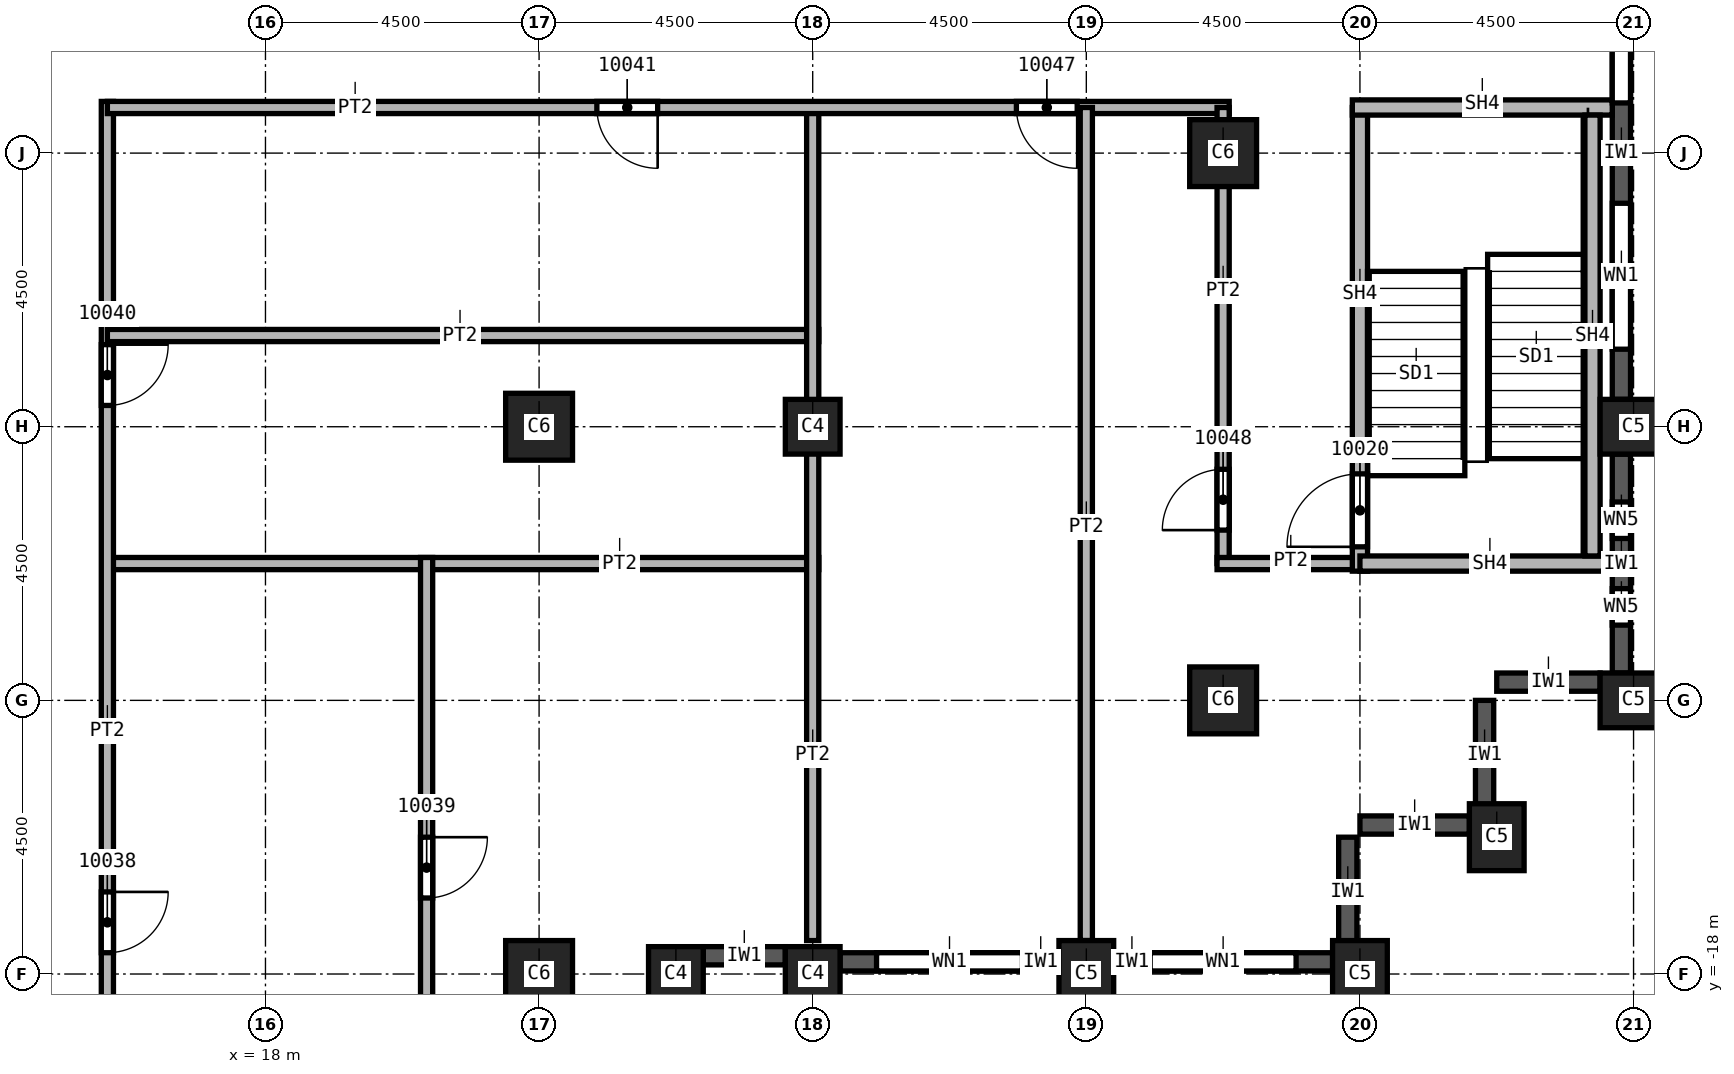
"""IFC4 building model, lengths in metres.
Left out: names, types, materials, properties, quantities, classifications, styles, units other than length and angle.
Written with IfcOpenShell. Run it as: python <this file> out.ifc"""

import sys

from ifc_helpers import new_model, si_unit, direction, frame, frame_2d, origin, origin_2d, place, context, subcontext, project, spatial, rectangle, extrude, element, fill, save


model = new_model("IFC4")
c1 = context("Model", 3, precision=1e-05, world=origin(), true_north=direction((0.0, 1.0)))
c2 = subcontext(c1, "Body", "Model", "MODEL_VIEW")
j1 = project(units=[si_unit("LENGTHUNIT", "METRE"), si_unit("PLANEANGLEUNIT", "RADIAN")], contexts=[c1])
p1 = place(None, origin())
s1 = spatial("IfcSite", under=j1, at=p1, CompositionType="ELEMENT")
p2 = place(p1, origin())
s2 = spatial("IfcBuilding", under=s1, at=p2, CompositionType="ELEMENT")
p3 = place(p2, frame((0.0, 0.0, 174.0)))
s3 = spatial("IfcBuildingStorey", under=s2, at=p3, CompositionType="ELEMENT", Elevation=174.0)
for number, where, z_axis, x_axis in (
    (1, (40.5, -9.0, 0.0), (0.0, 0.0, 1.0), (0.0, 1.0, 0.0)),
    (2, (40.5, -13.5, 0.0), (0.0, 0.0, 1.0), (0.0, 1.0, 0.0)),
    (3, (38.25, -15.75, 0.0), (0.0, 0.0, 1.0), (1.0, 0.0, 0.0)),
    (4, (31.5, -18.0, 0.0), (0.0, 0.0, 1.0), (1.0, 0.0, 0.0)),
    (5, (36.0, -18.0, 0.0), (0.0, 0.0, 1.0), (1.0, 0.0, 0.0)),
):
    element("IfcColumn", number, at=place(p3, frame(where, z_axis=z_axis, x_axis=x_axis)), inside=s3, PredefinedType="COLUMN", context=c2, shape_type="SweptSolid", body=[
        extrude(rectangle(XDim=0.9, YDim=1.1, at=origin_2d()), origin(), (0.0, 0.0, 1.0), 3.59),
    ])
for number, where, z_axis, x_axis in (
    (6, (33.75, -4.5, 0.0), (0.0, 0.0, 1.0), (1.0, 0.0, 0.0)),
    (7, (33.75, -13.5, 0.0), (0.0, 0.0, 1.0), (1.0, 0.0, 0.0)),
    (8, (22.5, -9.0, 0.0), (0.0, 0.0, 1.0), (1.0, 0.0, 0.0)),
    (9, (22.5, -18.0, 0.0), (0.0, 0.0, 1.0), (1.0, 0.0, 0.0)),
):
    element("IfcColumn", number, at=place(p3, frame(where, z_axis=z_axis, x_axis=x_axis)), inside=s3, PredefinedType="COLUMN", context=c2, shape_type="SweptSolid", body=[
        extrude(rectangle(XDim=1.1, YDim=1.1, at=origin_2d()), origin(), (0.0, 0.0, 1.0), 3.59),
    ])
for number, where, z_axis, x_axis in (
    (10, (27.0, -9.0, 0.0), (0.0, 0.0, 1.0), (1.0, 0.0, 0.0)),
    (11, (27.0, -18.0, 0.0), (0.0, 0.0, 1.0), (1.0, 0.0, 0.0)),
    (12, (24.75, -18.0, 0.0), (0.0, 0.0, 1.0), (1.0, 0.0, 0.0)),
):
    element("IfcColumn", number, at=place(p3, frame(where, z_axis=z_axis, x_axis=x_axis)), inside=s3, PredefinedType="COLUMN", context=c2, shape_type="SweptSolid", body=[
        extrude(rectangle(XDim=0.9, YDim=0.9, at=origin_2d()), origin(), (0.0, 0.0, 1.0), 3.59),
    ])
for number, where, z_axis, x_axis in (
    (13, (35.8, -17.55, 0.0), (0.0, 0.0, 1.0), (0.0, 1.0, 0.0)),
    (14, (37.8, -15.55, 0.0), (0.0, 0.0, 1.0), (-1.0, 0.0, 0.0)),
    (15, (38.05, -15.3, 0.0), (0.0, 0.0, 1.0), (0.0, 1.0, 0.0)),
):
    element("IfcWall", number, at=place(p3, frame(where, z_axis=z_axis, x_axis=x_axis)), inside=s3, PredefinedType="SOLIDWALL", context=c2, shape_type="SweptSolid", body=[
        extrude(rectangle(XDim=1.8, YDim=0.3, at=frame_2d((0.9, 0.0))), origin(), (0.0, 0.0, 1.0), 2.99),
    ])
p4 = place(p3, frame((39.95, -13.2, 0.0), z_axis=(0.0, 0.0, 1.0), x_axis=(-1.0, 0.0, 0.0)))
e16 = element("IfcWall", 16, at=p4, inside=s3, PredefinedType="SOLIDWALL", context=c2, shape_type="SweptSolid", body=[
    extrude(rectangle(XDim=1.7, YDim=0.3, at=frame_2d((0.85, 0.0))), origin(), (0.0, 0.0, 1.0), 2.99),
])
p5 = place(p3, frame((25.2, -17.7, 0.0), z_axis=(0.0, 0.0, 1.0), x_axis=(1.0, 0.0, 0.0)))
e17 = element("IfcWall", 17, at=p5, inside=s3, PredefinedType="SOLIDWALL", context=c2, shape_type="SweptSolid", body=[
    extrude(rectangle(XDim=1.35, YDim=0.3, at=frame_2d((0.675, 0.0))), origin(), (0.0, 0.0, 1.0), 2.99),
])
p6 = place(p3, frame((27.45, -17.8, 0.0), z_axis=(0.0, 0.0, 1.0), x_axis=(1.0, 0.0, 0.0)))
e18 = element("IfcWall", 18, at=p6, inside=s3, PredefinedType="SOLIDWALL", context=c2, shape_type="SweptSolid", body=[
    extrude(rectangle(XDim=3.6, YDim=0.3, at=frame_2d((1.8, 0.0))), origin(), (0.0, 0.0, 1.0), 2.99),
])
p7 = place(p6, frame((0.6, 0.0, 0.8)))
e19 = element("IfcOpeningElement", 19, at=p7, cuts=e18, PredefinedType="OPENING", context=c2, shape_type="SweptSolid", body=[
    extrude(rectangle(XDim=2.4, YDim=1.95, at=frame_2d((1.2, 0.975))), frame((0.0, 0.15, 0.0), z_axis=(0.0, -1.0, 0.0), x_axis=(1.0, 0.0, 0.0)), (0.0, 0.0, 1.0), 0.3),
])
p8 = place(p3, frame((31.95, -17.8, 0.0), z_axis=(0.0, 0.0, 1.0), x_axis=(1.0, 0.0, 0.0)))
e20 = element("IfcWall", 20, at=p8, inside=s3, PredefinedType="SOLIDWALL", context=c2, shape_type="SweptSolid", body=[
    extrude(rectangle(XDim=3.6, YDim=0.3, at=frame_2d((1.8, 0.0))), origin(), (0.0, 0.0, 1.0), 2.99),
])
p9 = place(p8, frame((0.6, 0.0, 0.8)))
e21 = element("IfcOpeningElement", 21, at=p9, cuts=e20, PredefinedType="OPENING", context=c2, shape_type="SweptSolid", body=[
    extrude(rectangle(XDim=2.4, YDim=1.95, at=frame_2d((1.2, 0.975))), frame((0.0, 0.15, 0.0), z_axis=(0.0, -1.0, 0.0), x_axis=(1.0, 0.0, 0.0)), (0.0, 0.0, 1.0), 0.3),
])
p10 = place(p3, frame((40.3, -13.05, 0.0), z_axis=(0.0, 0.0, 1.0), x_axis=(0.0, 1.0, 0.0)))
e22 = element("IfcWall", 22, at=p10, inside=s3, PredefinedType="SOLIDWALL", context=c2, shape_type="SweptSolid", body=[
    extrude(rectangle(XDim=3.6, YDim=0.3, at=frame_2d((1.8, 0.0))), origin(), (0.0, 0.0, 1.0), 2.99),
])
p11 = place(p10, frame((0.788, 0.0, 0.8)))
e23 = element("IfcOpeningElement", 23, at=p11, cuts=e22, PredefinedType="OPENING", context=c2, shape_type="SweptSolid", body=[
    extrude(rectangle(XDim=0.6, YDim=1.95, at=frame_2d((0.3, 0.975))), frame((0.0, 0.15, 0.0), z_axis=(0.0, -1.0, 0.0), x_axis=(1.0, 0.0, 0.0)), (0.0, 0.0, 1.0), 0.3),
])
p12 = place(p10, frame((2.212, 0.0, 0.8)))
e24 = element("IfcOpeningElement", 24, at=p12, cuts=e22, PredefinedType="OPENING", context=c2, shape_type="SweptSolid", body=[
    extrude(rectangle(XDim=0.6, YDim=1.95, at=frame_2d((0.3, 0.975))), frame((0.0, 0.15, 0.0), z_axis=(0.0, -1.0, 0.0), x_axis=(1.0, 0.0, 0.0)), (0.0, 0.0, 1.0), 0.3),
])
p13 = place(p3, frame((40.3, -8.55, 0.0), z_axis=(0.0, 0.0, 1.0), x_axis=(0.0, 1.0, 0.0)))
e25 = element("IfcWall", 25, at=p13, inside=s3, PredefinedType="SOLIDWALL", context=c2, shape_type="SweptSolid", body=[
    extrude(rectangle(XDim=8.1, YDim=0.3, at=frame_2d((4.05, 0.0))), origin(), (0.0, 0.0, 1.0), 2.99),
])
p14 = place(p13, frame((0.825, 0.0, 0.8)))
e26 = element("IfcOpeningElement", 26, at=p14, cuts=e25, PredefinedType="OPENING", context=c2, shape_type="SweptSolid", body=[
    extrude(rectangle(XDim=2.4, YDim=1.95, at=frame_2d((1.2, 0.975))), frame((0.0, 0.15, 0.0), z_axis=(0.0, -1.0, 0.0), x_axis=(1.0, 0.0, 0.0)), (0.0, 0.0, 1.0), 0.3),
])
p15 = place(p13, frame((4.875, 0.0, 0.8)))
e27 = element("IfcOpeningElement", 27, at=p15, cuts=e25, PredefinedType="OPENING", context=c2, shape_type="SweptSolid", body=[
    extrude(rectangle(XDim=2.4, YDim=1.95, at=frame_2d((1.2, 0.975))), frame((0.0, 0.15, 0.0), z_axis=(0.0, -1.0, 0.0), x_axis=(1.0, 0.0, 0.0)), (0.0, 0.0, 1.0), 0.3),
])
p16 = place(p3, frame((15.4, -11.25, 0.0), z_axis=(0.0, 0.0, 1.0), x_axis=(1.0, 0.0, 0.0)))
e28 = element("IfcWall", 28, at=p16, inside=s3, PredefinedType="PARTITIONING", context=c2, shape_type="SweptSolid", body=[
    extrude(rectangle(XDim=11.7, YDim=0.2, at=frame_2d((5.85, 0.0))), origin(), (0.0, 0.0, 1.0), 3.59),
])
p17 = place(p3, frame((15.4, -3.65, 0.0), z_axis=(0.0, 0.0, 1.0), x_axis=(0.0, -1.0, 0.0)))
e29 = element("IfcWall", 29, at=p17, inside=s3, PredefinedType="PARTITIONING", context=c2, shape_type="SweptSolid", body=[
    extrude(rectangle(XDim=19.6, YDim=0.2, at=frame_2d((9.8, 0.0))), origin(), (0.0, 0.0, 1.0), 3.59),
])
p18 = place(p17, frame((13.0, 0.0, 0.0)))
e30 = element("IfcOpeningElement", 30, at=p18, cuts=e29, PredefinedType="OPENING", context=c2, shape_type="SweptSolid", body=[
    extrude(rectangle(XDim=1.0, YDim=2.1, at=frame_2d((0.5, 1.05))), frame((0.0, 0.1, 0.0), z_axis=(0.0, -1.0, 0.0), x_axis=(1.0, 0.0, 0.0)), (0.0, 0.0, 1.0), 0.2),
])
p19 = place(p17, frame((4.0, 0.0, 0.0)))
e31 = element("IfcOpeningElement", 31, at=p19, cuts=e29, PredefinedType="OPENING", context=c2, shape_type="SweptSolid", body=[
    extrude(rectangle(XDim=1.0, YDim=2.1, at=frame_2d((0.5, 1.05))), frame((0.0, 0.1, 0.0), z_axis=(0.0, -1.0, 0.0), x_axis=(1.0, 0.0, 0.0)), (0.0, 0.0, 1.0), 0.2),
])
p20 = place(p3, frame((15.4, -7.5, 0.0), z_axis=(0.0, 0.0, 1.0), x_axis=(1.0, 0.0, 0.0)))
e32 = element("IfcWall", 32, at=p20, inside=s3, PredefinedType="PARTITIONING", context=c2, shape_type="SweptSolid", body=[
    extrude(rectangle(XDim=11.7, YDim=0.2, at=frame_2d((5.85, 0.0))), origin(), (0.0, 0.0, 1.0), 3.59),
])
p21 = place(p3, frame((20.65, -11.15, 0.0), z_axis=(0.0, 0.0, 1.0), x_axis=(0.0, -1.0, 0.0)))
e33 = element("IfcWall", 33, at=p21, inside=s3, PredefinedType="PARTITIONING", context=c2, shape_type="SweptSolid", body=[
    extrude(rectangle(XDim=12.1, YDim=0.2, at=frame_2d((6.05, 0.0))), origin(), (0.0, 0.0, 1.0), 3.59),
])
p22 = place(p21, frame((4.6, 0.0, 0.0)))
e34 = element("IfcOpeningElement", 34, at=p22, cuts=e33, PredefinedType="OPENING", context=c2, shape_type="SweptSolid", body=[
    extrude(rectangle(XDim=1.0, YDim=2.1, at=frame_2d((0.5, 1.05))), frame((0.0, 0.1, 0.0), z_axis=(0.0, -1.0, 0.0), x_axis=(1.0, 0.0, 0.0)), (0.0, 0.0, 1.0), 0.2),
])
p23 = place(p3, frame((27.0, -3.75, 0.0), z_axis=(0.0, 0.0, 1.0), x_axis=(0.0, -1.0, 0.0)))
e35 = element("IfcWall", 35, at=p23, inside=s3, PredefinedType="PARTITIONING", context=c2, shape_type="SweptSolid", body=[
    extrude(rectangle(XDim=13.7, YDim=0.2, at=frame_2d((6.85, 0.0))), origin(), (0.0, 0.0, 1.0), 3.59),
])
p24 = place(p3, frame((33.85, -3.75, 0.0), z_axis=(0.0, 0.0, 1.0), x_axis=(-1.0, 0.0, 0.0)))
e36 = element("IfcWall", 36, at=p24, inside=s3, PredefinedType="PARTITIONING", context=c2, shape_type="SweptSolid", body=[
    extrude(rectangle(XDim=18.45, YDim=0.2, at=frame_2d((9.225, 0.0))), origin(), (0.0, 0.0, 1.0), 3.59),
])
p25 = place(p24, frame((9.4, 0.0, 0.0)))
e37 = element("IfcOpeningElement", 37, at=p25, cuts=e36, PredefinedType="OPENING", context=c2, shape_type="SweptSolid", body=[
    extrude(rectangle(XDim=1.0, YDim=2.1, at=frame_2d((0.5, 1.05))), frame((0.0, 0.1, 0.0), z_axis=(0.0, -1.0, 0.0), x_axis=(1.0, 0.0, 0.0)), (0.0, 0.0, 1.0), 0.2),
])
p26 = place(p24, frame((2.5, 0.0, 0.0)))
e38 = element("IfcOpeningElement", 38, at=p26, cuts=e36, PredefinedType="OPENING", context=c2, shape_type="SweptSolid", body=[
    extrude(rectangle(XDim=1.0, YDim=2.1, at=frame_2d((0.5, 1.05))), frame((0.0, 0.1, 0.0), z_axis=(0.0, -1.0, 0.0), x_axis=(1.0, 0.0, 0.0)), (0.0, 0.0, 1.0), 0.2),
])
p27 = place(p3, frame((31.5, -3.75, 0.0), z_axis=(0.0, 0.0, 1.0), x_axis=(0.0, -1.0, 0.0)))
e39 = element("IfcWall", 39, at=p27, inside=s3, PredefinedType="PARTITIONING", context=c2, shape_type="SweptSolid", body=[
    extrude(rectangle(XDim=13.7, YDim=0.2, at=frame_2d((6.85, 0.0))), origin(), (0.0, 0.0, 1.0), 3.59),
])
p28 = place(p3, frame((33.75, -11.25, 0.0), z_axis=(0.0, 0.0, 1.0), x_axis=(0.0, 1.0, 0.0)))
e40 = element("IfcWall", 40, at=p28, inside=s3, PredefinedType="PARTITIONING", context=c2, shape_type="SweptSolid", body=[
    extrude(rectangle(XDim=7.5, YDim=0.2, at=frame_2d((3.75, 0.0))), origin(), (0.0, 0.0, 1.0), 3.59),
])
p29 = place(p28, frame((0.55, 0.0, 0.0)))
e41 = element("IfcOpeningElement", 41, at=p29, cuts=e40, PredefinedType="OPENING", context=c2, shape_type="SweptSolid", body=[
    extrude(rectangle(XDim=1.0, YDim=2.1, at=frame_2d((0.5, 1.05))), frame((0.0, 0.1, 0.0), z_axis=(0.0, -1.0, 0.0), x_axis=(1.0, 0.0, 0.0)), (0.0, 0.0, 1.0), 0.2),
])
p30 = place(p3, frame((36.0, -11.25, 0.0), z_axis=(0.0, 0.0, 1.0), x_axis=(-1.0, 0.0, 0.0)))
e42 = element("IfcWall", 42, at=p30, inside=s3, PredefinedType="PARTITIONING", context=c2, shape_type="SweptSolid", body=[
    extrude(rectangle(XDim=2.35, YDim=0.2, at=frame_2d((1.175, 0.0))), origin(), (0.0, 0.0, 1.0), 3.59),
])
p31 = place(p3, frame((36.0, -11.375, 0.0), z_axis=(0.0, 0.0, 1.0), x_axis=(0.0, 1.0, 0.0)))
e43 = element("IfcWall", 43, at=p31, inside=s3, PredefinedType="SOLIDWALL", context=c2, shape_type="SweptSolid", body=[
    extrude(rectangle(XDim=7.625, YDim=0.25, at=frame_2d((3.812, 0.0))), origin(), (0.0, 0.0, 1.0), 3.59),
])
p32 = place(p31, frame((0.4, 0.0, 0.0)))
e44 = element("IfcOpeningElement", 44, at=p32, cuts=e43, PredefinedType="OPENING", context=c2, shape_type="SweptSolid", body=[
    extrude(rectangle(XDim=1.2, YDim=2.1, at=frame_2d((0.6, 1.05))), frame((0.0, 0.125, 0.0), z_axis=(0.0, -1.0, 0.0), x_axis=(1.0, 0.0, 0.0)), (0.0, 0.0, 1.0), 0.25),
])
p33 = place(p3, frame((40.15, -11.25, 0.0), z_axis=(0.0, 0.0, 1.0), x_axis=(-1.0, 0.0, 0.0)))
e45 = element("IfcWall", 45, at=p33, inside=s3, PredefinedType="SOLIDWALL", context=c2, shape_type="SweptSolid", body=[
    extrude(rectangle(XDim=4.15, YDim=0.25, at=frame_2d((2.075, 0.0))), origin(), (0.0, 0.0, 1.0), 3.59),
])
p34 = place(p3, frame((40.15, -3.75, 0.0), z_axis=(0.0, 0.0, 1.0), x_axis=(-1.0, 0.0, 0.0)))
e46 = element("IfcWall", 46, at=p34, inside=s3, PredefinedType="SOLIDWALL", context=c2, shape_type="SweptSolid", body=[
    extrude(rectangle(XDim=4.275, YDim=0.25, at=frame_2d((2.137, 0.0))), origin(), (0.0, 0.0, 1.0), 3.59),
])
p35 = place(p3, frame((39.825, -11.125, 0.0), z_axis=(0.0, 0.0, 1.0), x_axis=(0.0, 1.0, 0.0)))
e47 = element("IfcWall", 47, at=p35, inside=s3, PredefinedType="SOLIDWALL", context=c2, shape_type="SweptSolid", body=[
    extrude(rectangle(XDim=7.25, YDim=0.25, at=frame_2d((3.625, 0.0))), origin(), (0.0, 0.0, 1.0), 3.59),
])
p36 = place(p7, origin())
e48 = element("IfcWindow", 48, at=p36, inside=s3, PartitioningType="SINGLE_PANEL", PredefinedType="WINDOW", context=c2, shape_type="SweptSolid", body=[
    extrude(rectangle(XDim=2.4, YDim=1.95, at=frame_2d((1.2, 0.975))), frame((0.0, 0.03, 0.0), z_axis=(0.0, -1.0, 0.0), x_axis=(1.0, 0.0, 0.0)), (0.0, 0.0, 1.0), 0.06),
])
fill(e19, e48)
p37 = place(p9, origin())
e49 = element("IfcWindow", 49, at=p37, inside=s3, PartitioningType="SINGLE_PANEL", PredefinedType="WINDOW", context=c2, shape_type="SweptSolid", body=[
    extrude(rectangle(XDim=2.4, YDim=1.95, at=frame_2d((1.2, 0.975))), frame((0.0, 0.03, 0.0), z_axis=(0.0, -1.0, 0.0), x_axis=(1.0, 0.0, 0.0)), (0.0, 0.0, 1.0), 0.06),
])
fill(e21, e49)
p38 = place(p14, origin())
e50 = element("IfcWindow", 50, at=p38, inside=s3, PartitioningType="SINGLE_PANEL", PredefinedType="WINDOW", context=c2, shape_type="SweptSolid", body=[
    extrude(rectangle(XDim=2.4, YDim=1.95, at=frame_2d((1.2, 0.975))), frame((0.0, 0.03, 0.0), z_axis=(0.0, -1.0, 0.0), x_axis=(1.0, 0.0, 0.0)), (0.0, 0.0, 1.0), 0.06),
])
fill(e26, e50)
p39 = place(p15, origin())
e51 = element("IfcWindow", 51, at=p39, inside=s3, PartitioningType="SINGLE_PANEL", PredefinedType="WINDOW", context=c2, shape_type="SweptSolid", body=[
    extrude(rectangle(XDim=2.4, YDim=1.95, at=frame_2d((1.2, 0.975))), frame((0.0, 0.03, 0.0), z_axis=(0.0, -1.0, 0.0), x_axis=(1.0, 0.0, 0.0)), (0.0, 0.0, 1.0), 0.06),
])
fill(e27, e51)
p40 = place(p32, origin())
e52 = element("IfcDoor", 52, at=p40, inside=s3, OperationType="SINGLE_SWING_LEFT", PredefinedType="DOOR", context=c2, shape_type="SweptSolid", body=[
    extrude(rectangle(XDim=1.2, YDim=2.1, at=frame_2d((0.6, 1.05))), frame((0.0, 0.025, 0.0), z_axis=(0.0, -1.0, 0.0), x_axis=(1.0, 0.0, 0.0)), (0.0, 0.0, 1.0), 0.05),
])
fill(e44, e52)
p41 = place(p18, origin())
e53 = element("IfcDoor", 53, at=p41, inside=s3, OperationType="SINGLE_SWING_LEFT", PredefinedType="DOOR", context=c2, shape_type="SweptSolid", body=[
    extrude(rectangle(XDim=1.0, YDim=2.1, at=frame_2d((0.5, 1.05))), frame((0.0, 0.025, 0.0), z_axis=(0.0, -1.0, 0.0), x_axis=(1.0, 0.0, 0.0)), (0.0, 0.0, 1.0), 0.05),
])
fill(e30, e53)
p42 = place(p22, origin())
e54 = element("IfcDoor", 54, at=p42, inside=s3, OperationType="SINGLE_SWING_RIGHT", PredefinedType="DOOR", context=c2, shape_type="SweptSolid", body=[
    extrude(rectangle(XDim=1.0, YDim=2.1, at=frame_2d((0.5, 1.05))), frame((0.0, 0.025, 0.0), z_axis=(0.0, -1.0, 0.0), x_axis=(1.0, 0.0, 0.0)), (0.0, 0.0, 1.0), 0.05),
])
fill(e34, e54)
p43 = place(p19, origin())
e55 = element("IfcDoor", 55, at=p43, inside=s3, OperationType="SINGLE_SWING_LEFT", PredefinedType="DOOR", context=c2, shape_type="SweptSolid", body=[
    extrude(rectangle(XDim=1.0, YDim=2.1, at=frame_2d((0.5, 1.05))), frame((0.0, 0.025, 0.0), z_axis=(0.0, -1.0, 0.0), x_axis=(1.0, 0.0, 0.0)), (0.0, 0.0, 1.0), 0.05),
])
fill(e31, e55)
p44 = place(p25, origin())
e56 = element("IfcDoor", 56, at=p44, inside=s3, OperationType="SINGLE_SWING_RIGHT", PredefinedType="DOOR", context=c2, shape_type="SweptSolid", body=[
    extrude(rectangle(XDim=1.0, YDim=2.1, at=frame_2d((0.5, 1.05))), frame((0.0, 0.025, 0.0), z_axis=(0.0, -1.0, 0.0), x_axis=(1.0, 0.0, 0.0)), (0.0, 0.0, 1.0), 0.05),
])
fill(e37, e56)
p45 = place(p26, origin())
e57 = element("IfcDoor", 57, at=p45, inside=s3, OperationType="SINGLE_SWING_RIGHT", PredefinedType="DOOR", context=c2, shape_type="SweptSolid", body=[
    extrude(rectangle(XDim=1.0, YDim=2.1, at=frame_2d((0.5, 1.05))), frame((0.0, 0.025, 0.0), z_axis=(0.0, -1.0, 0.0), x_axis=(1.0, 0.0, 0.0)), (0.0, 0.0, 1.0), 0.05),
])
fill(e38, e57)
p46 = place(p29, origin())
e58 = element("IfcDoor", 58, at=p46, inside=s3, OperationType="SINGLE_SWING_LEFT", PredefinedType="DOOR", context=c2, shape_type="SweptSolid", body=[
    extrude(rectangle(XDim=1.0, YDim=2.1, at=frame_2d((0.5, 1.05))), frame((0.0, 0.025, 0.0), z_axis=(0.0, -1.0, 0.0), x_axis=(1.0, 0.0, 0.0)), (0.0, 0.0, 1.0), 0.05),
])
fill(e41, e58)
p47 = place(p11, origin())
e59 = element("IfcWindow", 59, at=p47, inside=s3, PartitioningType="SINGLE_PANEL", PredefinedType="WINDOW", context=c2, shape_type="SweptSolid", body=[
    extrude(rectangle(XDim=0.6, YDim=1.95, at=frame_2d((0.3, 0.975))), frame((0.0, 0.03, 0.0), z_axis=(0.0, -1.0, 0.0), x_axis=(1.0, 0.0, 0.0)), (0.0, 0.0, 1.0), 0.06),
])
fill(e23, e59)
p48 = place(p12, origin())
e60 = element("IfcWindow", 60, at=p48, inside=s3, PartitioningType="SINGLE_PANEL", PredefinedType="WINDOW", context=c2, shape_type="SweptSolid", body=[
    extrude(rectangle(XDim=0.6, YDim=1.95, at=frame_2d((0.3, 0.975))), frame((0.0, 0.03, 0.0), z_axis=(0.0, -1.0, 0.0), x_axis=(1.0, 0.0, 0.0)), (0.0, 0.0, 1.0), 0.06),
])
fill(e24, e60)
save(model, sys.argv[1])
